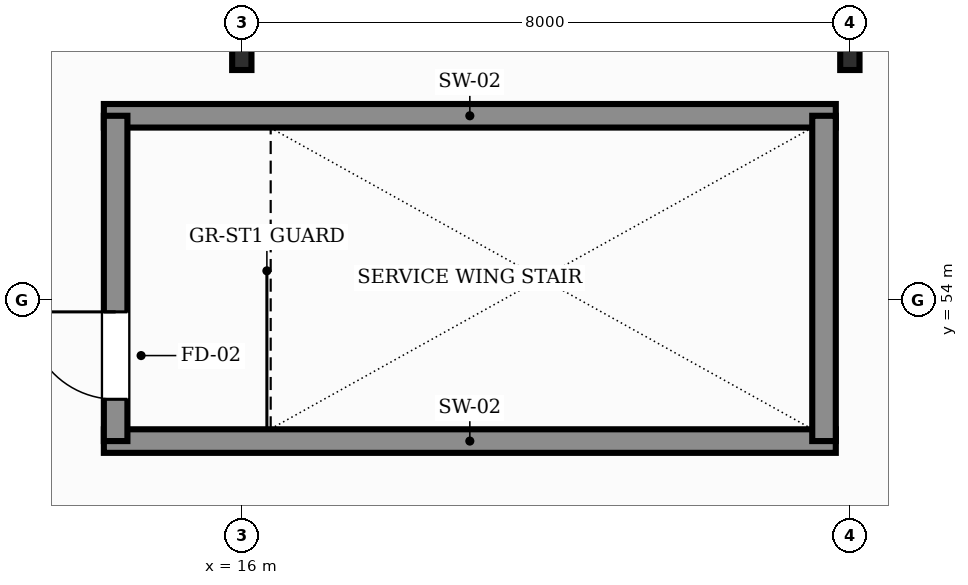
"""IFC4 building model, lengths in metres.
Left out: names, types, materials, properties, quantities, classifications, styles, units other than length and angle.
Written with IfcOpenShell. Run it as: python <this file> out.ifc"""

import sys

from ifc_helpers import new_model, si_unit, direction, frame, frame_2d, origin, origin_2d, place, context, subcontext, project, spatial, rectangle, hollow_rectangle, extrude, element, fill, save


model = new_model("IFC4")
c1 = context("Model", 3, precision=1e-05, world=origin(), true_north=direction((0.0, 1.0)))
c2 = subcontext(c1, "Body", "Model", "MODEL_VIEW")
j1 = project(units=[si_unit("LENGTHUNIT", "METRE"), si_unit("PLANEANGLEUNIT", "RADIAN")], contexts=[c1])
p1 = place(None, origin())
s1 = spatial("IfcSite", under=j1, at=p1, CompositionType="ELEMENT")
p2 = place(p1, origin())
s2 = spatial("IfcBuilding", under=s1, at=p2, CompositionType="ELEMENT")
p3 = place(p2, frame((0.0, 0.0, 6.0)))
s3 = spatial("IfcBuildingStorey", under=s2, at=p3, CompositionType="ELEMENT", Elevation=6.0)
for number, where, z_axis, x_axis in (
    (1, (16.0, 57.2, 0.0), (0.0, 0.0, 1.0), (1.0, 0.0, 0.0)),
    (2, (24.0, 57.2, 0.0), (0.0, 0.0, 1.0), (1.0, 0.0, 0.0)),
):
    element("IfcColumn", number, at=place(p3, frame(where, z_axis=z_axis, x_axis=x_axis)), inside=s3, PredefinedType="COLUMN", context=c2, shape_type="SweptSolid", body=[
        extrude(hollow_rectangle(XDim=0.254, YDim=0.356, WallThickness=0.016, InnerFilletRadius=0.016, OuterFilletRadius=0.032, at=origin_2d()), origin(), (0.0, 0.0, 1.0), 5.4),
    ])
for number, where, z_axis, x_axis in (
    (3, (14.185, 52.14, 0.0), (0.0, 0.0, 1.0), (1.0, 0.0, 0.0)),
    (4, (14.185, 56.42, 0.0), (0.0, 0.0, 1.0), (1.0, 0.0, 0.0)),
):
    element("IfcWall", number, at=place(p3, frame(where, z_axis=z_axis, x_axis=x_axis)), inside=s3, PredefinedType="SHEAR", context=c2, shape_type="SweptSolid", body=[
        extrude(rectangle(XDim=9.63, YDim=0.31, at=frame_2d((4.815, 0.0))), origin(), (0.0, 0.0, 1.0), 5.4),
    ])
p4 = place(p3, frame((14.34, 52.14, 0.0), z_axis=(0.0, 0.0, 1.0), x_axis=(0.0, 1.0, 0.0)))
e5 = element("IfcWall", 5, at=p4, inside=s3, PredefinedType="SHEAR", context=c2, shape_type="SweptSolid", body=[
    extrude(rectangle(XDim=4.28, YDim=0.31, at=frame_2d((2.14, 0.0))), origin(), (0.0, 0.0, 1.0), 5.4),
])
p5 = place(p4, frame((0.55, 0.0, 0.0)))
e6 = element("IfcOpeningElement", 6, at=p5, cuts=e5, PredefinedType="OPENING", context=c2, shape_type="SweptSolid", body=[
    extrude(rectangle(XDim=1.15, YDim=2.2, at=frame_2d((0.575, 1.1))), frame((0.0, 0.165, 0.0), z_axis=(0.0, -1.0, 0.0), x_axis=(1.0, 0.0, 0.0)), (0.0, 0.0, 1.0), 0.33),
])
p6 = place(p3, frame((23.66, 52.14, 0.0), z_axis=(0.0, 0.0, 1.0), x_axis=(0.0, 1.0, 0.0)))
e7 = element("IfcWall", 7, at=p6, inside=s3, PredefinedType="SHEAR", context=c2, shape_type="SweptSolid", body=[
    extrude(rectangle(XDim=4.28, YDim=0.31, at=frame_2d((2.14, 0.0))), origin(), (0.0, 0.0, 1.0), 5.4),
])
p7 = place(p5, origin())
e8 = element("IfcDoor", 8, at=p7, inside=s3, OperationType="SINGLE_SWING_RIGHT", PredefinedType="DOOR", context=c2, shape_type="SweptSolid", body=[
    extrude(rectangle(XDim=1.15, YDim=2.2, at=frame_2d((0.575, 1.1))), frame((0.0, 0.025, 0.0), z_axis=(0.0, -1.0, 0.0), x_axis=(1.0, 0.0, 0.0)), (0.0, 0.0, 1.0), 0.05),
])
fill(e6, e8)
save(model, sys.argv[1])
